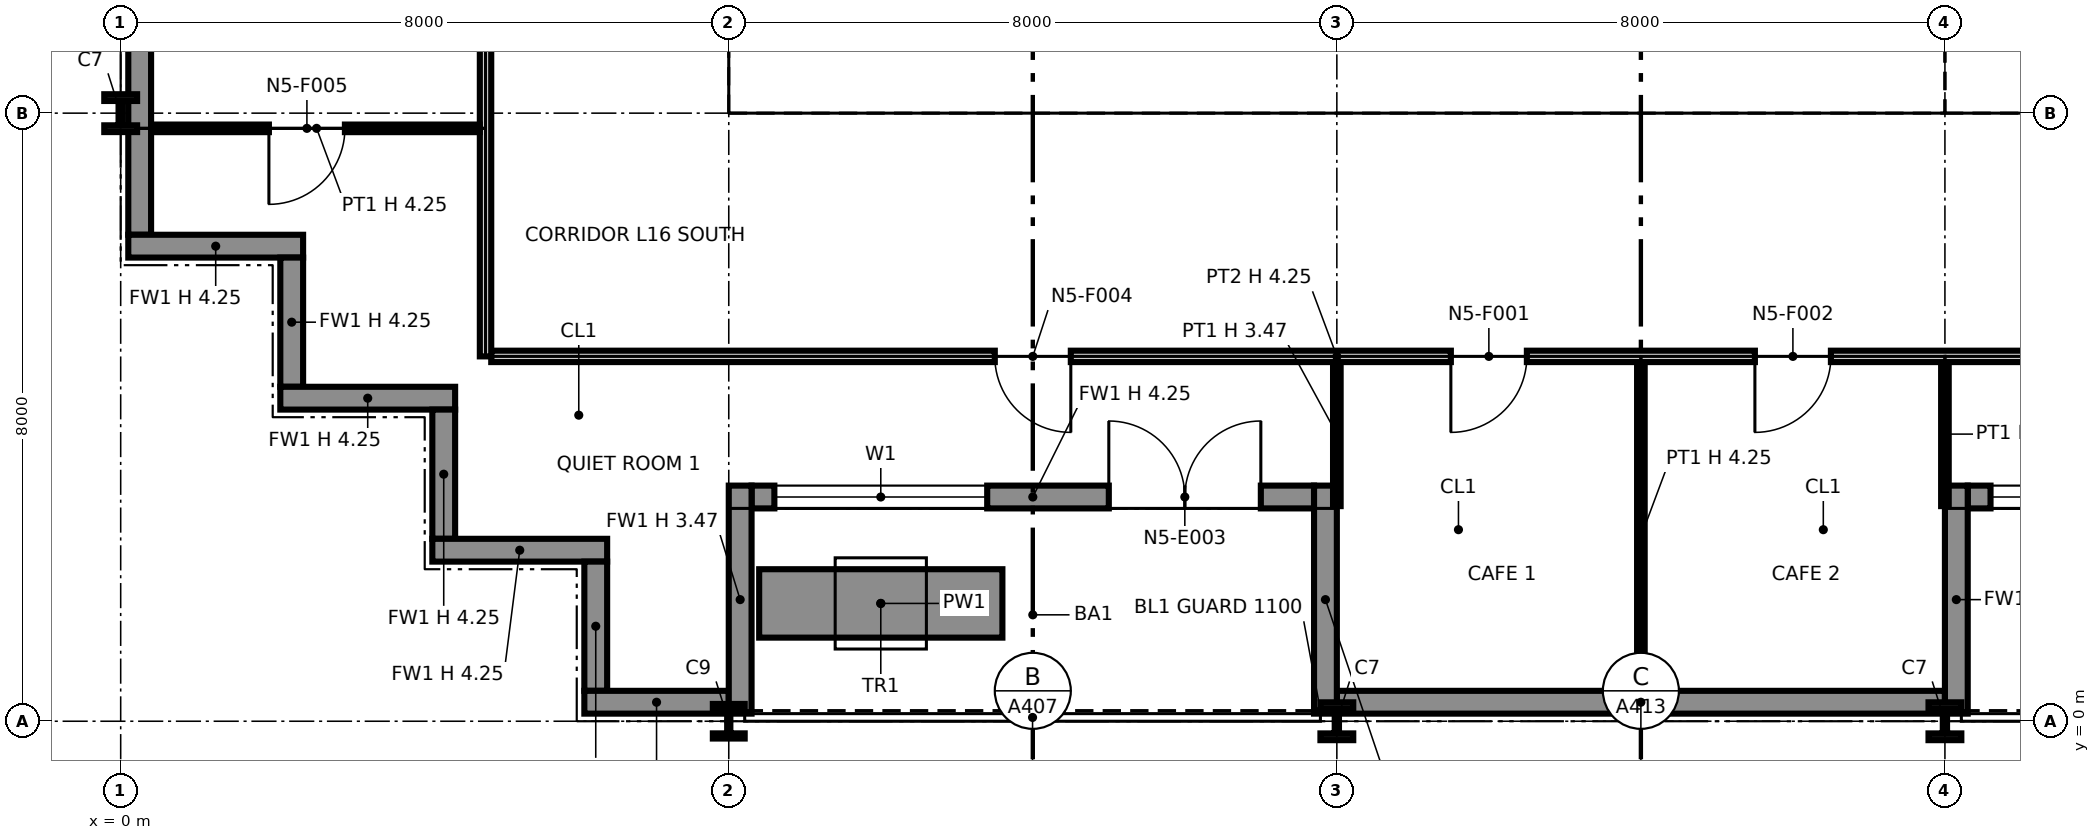
"""IFC4 building model, lengths in metres.
Left out: names, types, materials, properties, quantities, classifications, styles, units other than length and angle.
Written with IfcOpenShell. Run it as: python <this file> out.ifc"""

import sys

from ifc_helpers import new_model, si_unit, direction, frame, frame_2d, origin, origin_2d, place, context, subcontext, project, spatial, polyline, rectangle, i_section, outline, extrude, element, fill, save


model = new_model("IFC4")
c1 = context("Model", 3, precision=1e-05, world=origin(), true_north=direction((0.0, 1.0)))
c2 = subcontext(c1, "Body", "Model", "MODEL_VIEW")
j1 = project(units=[si_unit("LENGTHUNIT", "METRE"), si_unit("PLANEANGLEUNIT", "RADIAN")], contexts=[c1])
p1 = place(None, origin())
s1 = spatial("IfcSite", under=j1, at=p1, CompositionType="ELEMENT")
p2 = place(p1, origin())
s2 = spatial("IfcBuilding", under=s1, at=p2, CompositionType="ELEMENT")
p3 = place(p2, frame((0.0, 0.0, 87.6)))
s3 = spatial("IfcBuildingStorey", under=s2, at=p3, CompositionType="ELEMENT", Elevation=87.6)
p4 = place(p3, frame((0.0, 8.0, 0.0), z_axis=(0.0, 0.0, 1.0), x_axis=(1.0, 0.0, 0.0)))
e1 = element("IfcColumn", 1, at=p4, inside=s3, PredefinedType="COLUMN", context=c2, shape_type="SweptSolid", body=[
    extrude(i_section(OverallWidth=0.432, OverallDepth=0.498, WebThickness=0.056, FlangeThickness=0.089, at=origin_2d()), origin(), (0.0, 0.0, 1.0), 4.25),
])
p5 = place(p3, frame((8.0, 0.0, 0.0), z_axis=(0.0, 0.0, 1.0), x_axis=(1.0, 0.0, 0.0)))
e2 = element("IfcColumn", 2, at=p5, inside=s3, PredefinedType="COLUMN", context=c2, shape_type="SweptSolid", body=[
    extrude(i_section(OverallWidth=0.419, OverallDepth=0.455, WebThickness=0.042, FlangeThickness=0.068, at=origin_2d()), origin(), (0.0, 0.0, 1.0), 4.25),
])
p6 = place(p3, frame((8.0, 8.0, 0.0), z_axis=(0.0, 0.0, 1.0), x_axis=(1.0, 0.0, 0.0)))
e3 = element("IfcColumn", 3, at=p6, inside=s3, PredefinedType="COLUMN", context=c2, shape_type="SweptSolid", body=[
    extrude(i_section(OverallWidth=0.406, OverallDepth=0.417, WebThickness=0.03, FlangeThickness=0.048, at=origin_2d()), origin(), (0.0, 0.0, 1.0), 4.25),
])
p7 = place(p3, frame((16.0, 0.0, 0.0), z_axis=(0.0, 0.0, 1.0), x_axis=(1.0, 0.0, 0.0)))
e4 = element("IfcColumn", 4, at=p7, inside=s3, PredefinedType="COLUMN", context=c2, shape_type="SweptSolid", body=[
    extrude(i_section(OverallWidth=0.432, OverallDepth=0.498, WebThickness=0.056, FlangeThickness=0.089, at=origin_2d()), origin(), (0.0, 0.0, 1.0), 4.25),
])
p8 = place(p3, frame((16.0, 8.0, 0.0), z_axis=(0.0, 0.0, 1.0), x_axis=(1.0, 0.0, 0.0)))
e5 = element("IfcColumn", 5, at=p8, inside=s3, PredefinedType="COLUMN", context=c2, shape_type="SweptSolid", body=[
    extrude(i_section(OverallWidth=0.406, OverallDepth=0.417, WebThickness=0.03, FlangeThickness=0.048, at=origin_2d()), origin(), (0.0, 0.0, 1.0), 4.25),
])
p9 = place(p3, frame((24.0, 0.0, 0.0), z_axis=(0.0, 0.0, 1.0), x_axis=(1.0, 0.0, 0.0)))
e6 = element("IfcColumn", 6, at=p9, inside=s3, PredefinedType="COLUMN", context=c2, shape_type="SweptSolid", body=[
    extrude(i_section(OverallWidth=0.432, OverallDepth=0.498, WebThickness=0.056, FlangeThickness=0.089, at=origin_2d()), origin(), (0.0, 0.0, 1.0), 4.25),
])
p10 = place(p3, frame((24.0, 8.0, 0.0), z_axis=(0.0, 0.0, 1.0), x_axis=(1.0, 0.0, 0.0)))
e7 = element("IfcColumn", 7, at=p10, inside=s3, PredefinedType="COLUMN", context=c2, shape_type="SweptSolid", body=[
    extrude(i_section(OverallWidth=0.411, OverallDepth=0.434, WebThickness=0.036, FlangeThickness=0.057, at=origin_2d()), origin(), (0.0, 0.0, 1.0), 4.25),
])
p11 = place(p3, frame((0.25, 16.0, 0.0), z_axis=(0.0, 0.0, 1.0), x_axis=(0.0, -1.0, 0.0)))
e8 = element("IfcWall", 8, at=p11, inside=s3, PredefinedType="SOLIDWALL", context=c2, shape_type="SweptSolid", body=[
    extrude(rectangle(XDim=9.6, YDim=0.3, at=frame_2d((4.8, 0.0))), origin(), (0.0, 0.0, 1.0), 4.25),
])
p12 = place(p3, frame((0.1, 6.25, 0.0), z_axis=(0.0, 0.0, 1.0), x_axis=(1.0, 0.0, 0.0)))
e9 = element("IfcWall", 9, at=p12, inside=s3, PredefinedType="SOLIDWALL", context=c2, shape_type="SweptSolid", body=[
    extrude(rectangle(XDim=2.3, YDim=0.3, at=frame_2d((1.15, 0.0))), origin(), (0.0, 0.0, 1.0), 4.25),
])
p13 = place(p3, frame((2.25, 6.1, 0.0), z_axis=(0.0, 0.0, 1.0), x_axis=(0.0, -1.0, 0.0)))
e10 = element("IfcWall", 10, at=p13, inside=s3, PredefinedType="SOLIDWALL", context=c2, shape_type="SweptSolid", body=[
    extrude(rectangle(XDim=1.7, YDim=0.3, at=frame_2d((0.85, 0.0))), origin(), (0.0, 0.0, 1.0), 4.25),
])
p14 = place(p3, frame((2.1, 4.25, 0.0), z_axis=(0.0, 0.0, 1.0), x_axis=(1.0, 0.0, 0.0)))
e11 = element("IfcWall", 11, at=p14, inside=s3, PredefinedType="SOLIDWALL", context=c2, shape_type="SweptSolid", body=[
    extrude(rectangle(XDim=2.3, YDim=0.3, at=frame_2d((1.15, 0.0))), origin(), (0.0, 0.0, 1.0), 4.25),
])
p15 = place(p3, frame((4.25, 4.1, 0.0), z_axis=(0.0, 0.0, 1.0), x_axis=(0.0, -1.0, 0.0)))
e12 = element("IfcWall", 12, at=p15, inside=s3, PredefinedType="SOLIDWALL", context=c2, shape_type="SweptSolid", body=[
    extrude(rectangle(XDim=1.7, YDim=0.3, at=frame_2d((0.85, 0.0))), origin(), (0.0, 0.0, 1.0), 4.25),
])
p16 = place(p3, frame((4.1, 2.25, 0.0), z_axis=(0.0, 0.0, 1.0), x_axis=(1.0, 0.0, 0.0)))
e13 = element("IfcWall", 13, at=p16, inside=s3, PredefinedType="SOLIDWALL", context=c2, shape_type="SweptSolid", body=[
    extrude(rectangle(XDim=2.3, YDim=0.3, at=frame_2d((1.15, 0.0))), origin(), (0.0, 0.0, 1.0), 4.25),
])
p17 = place(p3, frame((6.25, 2.1, 0.0), z_axis=(0.0, 0.0, 1.0), x_axis=(0.0, -1.0, 0.0)))
e14 = element("IfcWall", 14, at=p17, inside=s3, PredefinedType="SOLIDWALL", context=c2, shape_type="SweptSolid", body=[
    extrude(rectangle(XDim=1.7, YDim=0.3, at=frame_2d((0.85, 0.0))), origin(), (0.0, 0.0, 1.0), 4.25),
])
p18 = place(p3, frame((6.1, 0.25, 0.0), z_axis=(0.0, 0.0, 1.0), x_axis=(1.0, 0.0, 0.0)))
e15 = element("IfcWall", 15, at=p18, inside=s3, PredefinedType="SOLIDWALL", context=c2, shape_type="SweptSolid", body=[
    extrude(rectangle(XDim=1.9, YDim=0.3, at=frame_2d((0.95, 0.0))), origin(), (0.0, 0.0, 1.0), 4.25),
])
p19 = place(p3, frame((8.3, 2.95, 0.0), z_axis=(0.0, 0.0, 1.0), x_axis=(1.0, 0.0, 0.0)))
e16 = element("IfcWall", 16, at=p19, inside=s3, PredefinedType="SOLIDWALL", context=c2, shape_type="SweptSolid", body=[
    extrude(rectangle(XDim=7.4, YDim=0.3, at=frame_2d((3.7, 0.0))), origin(), (0.0, 0.0, 1.0), 4.25),
])
p20 = place(p19, frame((0.3, 0.0, 0.9)))
e17 = element("IfcOpeningElement", 17, at=p20, cuts=e16, PredefinedType="OPENING", context=c2, shape_type="SweptSolid", body=[
    extrude(rectangle(XDim=2.8, YDim=2.2, at=frame_2d((1.4, 1.1))), frame((0.0, 0.16, 0.0), z_axis=(0.0, -1.0, 0.0), x_axis=(1.0, 0.0, 0.0)), (0.0, 0.0, 1.0), 0.32),
])
p21 = place(p19, frame((4.7, 0.0, 0.0)))
e18 = element("IfcOpeningElement", 18, at=p21, cuts=e16, PredefinedType="OPENING", context=c2, shape_type="SweptSolid", body=[
    extrude(rectangle(XDim=2.0, YDim=2.4, at=frame_2d((1.0, 1.2))), frame((0.0, 0.16, 0.0), z_axis=(0.0, -1.0, 0.0), x_axis=(1.0, 0.0, 0.0)), (0.0, 0.0, 1.0), 0.32),
])
p22 = place(p3, frame((8.15, 0.1, 0.0), z_axis=(0.0, 0.0, 1.0), x_axis=(0.0, 1.0, 0.0)))
e19 = element("IfcWall", 19, at=p22, inside=s3, PredefinedType="SOLIDWALL", context=c2, shape_type="SweptSolid", body=[
    extrude(rectangle(XDim=3.0, YDim=0.3, at=frame_2d((1.5, 0.0))), origin(), (0.0, 0.0, 1.0), 3.469),
])
p23 = place(p3, frame((15.85, 0.1, 0.0), z_axis=(0.0, 0.0, 1.0), x_axis=(0.0, 1.0, 0.0)))
e20 = element("IfcWall", 20, at=p23, inside=s3, PredefinedType="SOLIDWALL", context=c2, shape_type="SweptSolid", body=[
    extrude(rectangle(XDim=3.0, YDim=0.3, at=frame_2d((1.5, 0.0))), origin(), (0.0, 0.0, 1.0), 3.556),
])
p24 = place(p3, frame((16.0, 0.25, 0.0), z_axis=(0.0, 0.0, 1.0), x_axis=(1.0, 0.0, 0.0)))
e21 = element("IfcWall", 21, at=p24, inside=s3, PredefinedType="SOLIDWALL", context=c2, shape_type="SweptSolid", body=[
    extrude(rectangle(XDim=8.0, YDim=0.3, at=frame_2d((4.0, 0.0))), origin(), (0.0, 0.0, 1.0), 4.25),
])
p25 = place(p3, frame((24.3, 2.95, 0.0), z_axis=(0.0, 0.0, 1.0), x_axis=(1.0, 0.0, 0.0)))
e22 = element("IfcWall", 22, at=p25, inside=s3, PredefinedType="SOLIDWALL", context=c2, shape_type="SweptSolid", body=[
    extrude(rectangle(XDim=7.4, YDim=0.3, at=frame_2d((3.7, 0.0))), origin(), (0.0, 0.0, 1.0), 4.25),
])
p26 = place(p25, frame((0.3, 0.0, 0.9)))
e23 = element("IfcOpeningElement", 23, at=p26, cuts=e22, PredefinedType="OPENING", context=c2, shape_type="SweptSolid", body=[
    extrude(rectangle(XDim=2.8, YDim=2.2, at=frame_2d((1.4, 1.1))), frame((0.0, 0.16, 0.0), z_axis=(0.0, -1.0, 0.0), x_axis=(1.0, 0.0, 0.0)), (0.0, 0.0, 1.0), 0.32),
])
p27 = place(p25, frame((4.7, 0.0, 0.0)))
e24 = element("IfcOpeningElement", 24, at=p27, cuts=e22, PredefinedType="OPENING", context=c2, shape_type="SweptSolid", body=[
    extrude(rectangle(XDim=2.0, YDim=2.4, at=frame_2d((1.0, 1.2))), frame((0.0, 0.16, 0.0), z_axis=(0.0, -1.0, 0.0), x_axis=(1.0, 0.0, 0.0)), (0.0, 0.0, 1.0), 0.32),
])
p28 = place(p3, frame((24.15, 0.1, 0.0), z_axis=(0.0, 0.0, 1.0), x_axis=(0.0, 1.0, 0.0)))
e25 = element("IfcWall", 25, at=p28, inside=s3, PredefinedType="SOLIDWALL", context=c2, shape_type="SweptSolid", body=[
    extrude(rectangle(XDim=3.0, YDim=0.3, at=frame_2d((1.5, 0.0))), origin(), (0.0, 0.0, 1.0), 3.556),
])
p29 = place(p3, frame((8.4, 1.55, 0.0), z_axis=(0.0, 0.0, 1.0), x_axis=(1.0, 0.0, 0.0)))
e26 = element("IfcWall", 26, at=p29, inside=s3, PredefinedType="SOLIDWALL", context=c2, shape_type="SweptSolid", body=[
    extrude(rectangle(XDim=3.2, YDim=0.9, at=frame_2d((1.6, 0.0))), origin(), (0.0, 0.0, 1.0), 0.6),
])
p30 = place(p3, frame((8.65, 8.75, 0.0), z_axis=(0.0, 0.0, 1.0), x_axis=(1.0, 0.0, 0.0)))
e27 = element("IfcWall", 27, at=p30, inside=s3, PredefinedType="PARTITIONING", context=c2, shape_type="SweptSolid", body=[
    extrude(outline(polyline([(0.0, 0.0), (14.7, 0.0), (14.7, 4.25), (7.469, 4.25), (7.469, 3.632), (7.231, 3.632), (7.23, 4.25), (0.0, 4.25), (0.0, 0.0)])), frame((0.0, 0.1, 0.0), z_axis=(0.0, -1.0, 0.0), x_axis=(1.0, 0.0, 0.0)), (0.0, 0.0, 1.0), 0.2),
])
p31 = place(p30, frame((1.3, 0.0, 0.0)))
e28 = element("IfcOpeningElement", 28, at=p31, cuts=e27, PredefinedType="OPENING", context=c2, shape_type="SweptSolid", body=[
    extrude(rectangle(XDim=1.4, YDim=2.1, at=frame_2d((0.7, 1.05))), frame((0.0, 0.11, 0.0), z_axis=(0.0, -1.0, 0.0), x_axis=(1.0, 0.0, 0.0)), (0.0, 0.0, 1.0), 0.22),
])
p32 = place(p30, frame((4.6, 0.0, 0.0)))
e29 = element("IfcOpeningElement", 29, at=p32, cuts=e27, PredefinedType="OPENING", context=c2, shape_type="SweptSolid", body=[
    extrude(rectangle(XDim=1.4, YDim=2.1, at=frame_2d((0.7, 1.05))), frame((0.0, 0.11, 0.0), z_axis=(0.0, -1.0, 0.0), x_axis=(1.0, 0.0, 0.0)), (0.0, 0.0, 1.0), 0.22),
])
p33 = place(p30, frame((10.4, 0.0, 0.0)))
e30 = element("IfcOpeningElement", 30, at=p33, cuts=e27, PredefinedType="OPENING", context=c2, shape_type="SweptSolid", body=[
    extrude(rectangle(XDim=1.2, YDim=2.1, at=frame_2d((0.6, 1.05))), frame((0.0, 0.11, 0.0), z_axis=(0.0, -1.0, 0.0), x_axis=(1.0, 0.0, 0.0)), (0.0, 0.0, 1.0), 0.22),
])
p34 = place(p3, frame((24.65, 8.75, 0.0), z_axis=(0.0, 0.0, 1.0), x_axis=(1.0, 0.0, 0.0)))
e31 = element("IfcWall", 31, at=p34, inside=s3, PredefinedType="PARTITIONING", context=c2, shape_type="SweptSolid", body=[
    extrude(outline(polyline([(0.0, 0.0), (14.7, 0.0), (14.7, 4.25), (7.469, 4.25), (7.469, 3.632), (7.231, 3.632), (7.23, 4.25), (0.0, 4.25), (0.0, 0.0)])), frame((0.0, 0.1, 0.0), z_axis=(0.0, -1.0, 0.0), x_axis=(1.0, 0.0, 0.0)), (0.0, 0.0, 1.0), 0.2),
])
p35 = place(p3, frame((20.0, 0.13, 0.0), z_axis=(0.0, 0.0, 1.0), x_axis=(0.0, 1.0, 0.0)))
e32 = element("IfcWall", 32, at=p35, inside=s3, PredefinedType="PARTITIONING", context=c2, shape_type="SweptSolid", body=[
    extrude(outline(polyline([(0.0, 0.0), (4.595, 0.0), (4.595, 4.25), (4.17, 4.25), (4.168, 3.47), (3.572, 3.47), (3.57, 4.25), (0.0, 4.25), (0.0, 0.0)])), frame((0.0, 0.05, 0.0), z_axis=(0.0, -1.0, 0.0), x_axis=(1.0, 0.0, 0.0)), (0.0, 0.0, 1.0), 0.1),
])
for number, where, z_axis, x_axis in (
    (33, (16.0, 2.83, 0.0), (0.0, 0.0, 1.0), (0.0, 1.0, 0.0)),
    (34, (24.0, 2.83, 0.0), (0.0, 0.0, 1.0), (0.0, 1.0, 0.0)),
):
    element("IfcWall", number, at=place(p3, frame(where, z_axis=z_axis, x_axis=x_axis)), inside=s3, PredefinedType="PARTITIONING", context=c2, shape_type="SweptSolid", body=[
        extrude(rectangle(XDim=1.895, YDim=0.1, at=frame_2d((0.948, 0.0))), origin(), (0.0, 0.0, 1.0), 3.47),
    ])
p36 = place(p3, frame((4.875, 4.8, 0.0), z_axis=(0.0, 0.0, 1.0), x_axis=(1.0, 0.0, 0.0)))
e35 = element("IfcWall", 35, at=p36, inside=s3, PredefinedType="PARTITIONING", context=c2, shape_type="SweptSolid", body=[
    extrude(rectangle(XDim=22.25, YDim=0.15, at=frame_2d((11.125, 0.0))), origin(), (0.0, 0.0, 1.0), 4.25),
])
p37 = place(p36, frame((13.625, 0.0, 0.0), z_axis=(0.0, 0.0, 1.0), x_axis=(-1.0, 0.0, 0.0)))
e36 = element("IfcOpeningElement", 36, at=p37, cuts=e35, PredefinedType="OPENING", context=c2, shape_type="SweptSolid", body=[
    extrude(rectangle(XDim=1.0, YDim=2.1, at=frame_2d((0.5, 1.05))), frame((0.0, 0.085, 0.0), z_axis=(0.0, -1.0, 0.0), x_axis=(1.0, 0.0, 0.0)), (0.0, 0.0, 1.0), 0.17),
])
p38 = place(p36, frame((17.625, 0.0, 0.0), z_axis=(0.0, 0.0, 1.0), x_axis=(-1.0, 0.0, 0.0)))
e37 = element("IfcOpeningElement", 37, at=p38, cuts=e35, PredefinedType="OPENING", context=c2, shape_type="SweptSolid", body=[
    extrude(rectangle(XDim=1.0, YDim=2.1, at=frame_2d((0.5, 1.05))), frame((0.0, 0.085, 0.0), z_axis=(0.0, -1.0, 0.0), x_axis=(1.0, 0.0, 0.0)), (0.0, 0.0, 1.0), 0.17),
])
p39 = place(p36, frame((7.625, 0.0, 0.0), z_axis=(0.0, 0.0, 1.0), x_axis=(-1.0, 0.0, 0.0)))
e38 = element("IfcOpeningElement", 38, at=p39, cuts=e35, PredefinedType="OPENING", context=c2, shape_type="SweptSolid", body=[
    extrude(rectangle(XDim=1.0, YDim=2.1, at=frame_2d((0.5, 1.05))), frame((0.0, 0.085, 0.0), z_axis=(0.0, -1.0, 0.0), x_axis=(1.0, 0.0, 0.0)), (0.0, 0.0, 1.0), 0.17),
])
p40 = place(p3, frame((4.8, 4.8, 0.0), z_axis=(0.0, 0.0, 1.0), x_axis=(0.0, 1.0, 0.0)))
e39 = element("IfcWall", 39, at=p40, inside=s3, PredefinedType="PARTITIONING", context=c2, shape_type="SweptSolid", body=[
    extrude(outline(polyline([(0.0, 0.0), (14.575, 0.0), (14.575, 4.25), (11.5, 4.25), (11.498, 3.47), (10.902, 3.47), (10.9, 4.25), (7.5, 4.25), (7.498, 3.47), (6.902, 3.47), (6.9, 4.25), (3.5, 4.25), (3.498, 3.47), (2.902, 3.47), (2.9, 4.25), (0.0, 4.25), (0.0, 0.0)])), frame((0.0, 0.075, 0.0), z_axis=(0.0, -1.0, 0.0), x_axis=(1.0, 0.0, 0.0)), (0.0, 0.0, 1.0), 0.15),
])
p41 = place(p40, frame((12.425, 0.0, 0.0)))
e40 = element("IfcOpeningElement", 40, at=p41, cuts=e39, PredefinedType="OPENING", context=c2, shape_type="SweptSolid", body=[
    extrude(rectangle(XDim=1.0, YDim=2.1, at=frame_2d((0.5, 1.05))), frame((0.0, 0.085, 0.0), z_axis=(0.0, -1.0, 0.0), x_axis=(1.0, 0.0, 0.0)), (0.0, 0.0, 1.0), 0.17),
])
p42 = place(p3, frame((0.43, 7.8, 0.0), z_axis=(0.0, 0.0, 1.0), x_axis=(1.0, 0.0, 0.0)))
e41 = element("IfcWall", 41, at=p42, inside=s3, PredefinedType="PARTITIONING", context=c2, shape_type="SweptSolid", body=[
    extrude(rectangle(XDim=4.295, YDim=0.1, at=frame_2d((2.147, 0.0))), origin(), (0.0, 0.0, 1.0), 4.25),
])
p43 = place(p42, frame((2.52, 0.0, 0.0), z_axis=(0.0, 0.0, 1.0), x_axis=(-1.0, 0.0, 0.0)))
e42 = element("IfcOpeningElement", 42, at=p43, cuts=e41, PredefinedType="OPENING", context=c2, shape_type="SweptSolid", body=[
    extrude(rectangle(XDim=1.0, YDim=2.1, at=frame_2d((0.5, 1.05))), frame((0.0, 0.06, 0.0), z_axis=(0.0, -1.0, 0.0), x_axis=(1.0, 0.0, 0.0)), (0.0, 0.0, 1.0), 0.12),
])
p44 = place(p20, origin())
e43 = element("IfcWindow", 43, at=p44, inside=s3, PartitioningType="SINGLE_PANEL", PredefinedType="WINDOW", context=c2, shape_type="SweptSolid", body=[
    extrude(rectangle(XDim=2.8, YDim=2.2, at=frame_2d((1.4, 1.1))), frame((0.0, 0.03, 0.0), z_axis=(0.0, -1.0, 0.0), x_axis=(1.0, 0.0, 0.0)), (0.0, 0.0, 1.0), 0.06),
])
fill(e17, e43)
p45 = place(p21, origin())
e44 = element("IfcDoor", 44, at=p45, inside=s3, OperationType="DOUBLE_DOOR_SINGLE_SWING", PredefinedType="DOOR", context=c2, shape_type="SweptSolid", body=[
    extrude(rectangle(XDim=2.0, YDim=2.4, at=frame_2d((1.0, 1.2))), frame((0.0, 0.025, 0.0), z_axis=(0.0, -1.0, 0.0), x_axis=(1.0, 0.0, 0.0)), (0.0, 0.0, 1.0), 0.05),
])
fill(e18, e44)
p46 = place(p26, origin())
e45 = element("IfcWindow", 45, at=p46, inside=s3, PartitioningType="SINGLE_PANEL", PredefinedType="WINDOW", context=c2, shape_type="SweptSolid", body=[
    extrude(rectangle(XDim=2.8, YDim=2.2, at=frame_2d((1.4, 1.1))), frame((0.0, 0.03, 0.0), z_axis=(0.0, -1.0, 0.0), x_axis=(1.0, 0.0, 0.0)), (0.0, 0.0, 1.0), 0.06),
])
fill(e23, e45)
p47 = place(p31, origin())
e46 = element("IfcDoor", 46, at=p47, inside=s3, OperationType="DOUBLE_DOOR_SINGLE_SWING", PredefinedType="NOTDEFINED", context=c2, shape_type="SweptSolid", body=[
    extrude(rectangle(XDim=1.4, YDim=2.1, at=frame_2d((0.7, 1.05))), frame((0.0, 0.025, 0.0), z_axis=(0.0, -1.0, 0.0), x_axis=(1.0, 0.0, 0.0)), (0.0, 0.0, 1.0), 0.05),
])
fill(e28, e46)
p48 = place(p32, origin())
e47 = element("IfcDoor", 47, at=p48, inside=s3, OperationType="DOUBLE_DOOR_SINGLE_SWING", PredefinedType="NOTDEFINED", context=c2, shape_type="SweptSolid", body=[
    extrude(rectangle(XDim=1.4, YDim=2.1, at=frame_2d((0.7, 1.05))), frame((0.0, 0.025, 0.0), z_axis=(0.0, -1.0, 0.0), x_axis=(1.0, 0.0, 0.0)), (0.0, 0.0, 1.0), 0.05),
])
fill(e29, e47)
p49 = place(p33, origin())
e48 = element("IfcDoor", 48, at=p49, inside=s3, OperationType="SINGLE_SWING_RIGHT", PredefinedType="NOTDEFINED", context=c2, shape_type="SweptSolid", body=[
    extrude(rectangle(XDim=1.2, YDim=2.1, at=frame_2d((0.6, 1.05))), frame((0.0, 0.025, 0.0), z_axis=(0.0, -1.0, 0.0), x_axis=(1.0, 0.0, 0.0)), (0.0, 0.0, 1.0), 0.05),
])
fill(e30, e48)
p50 = place(p37, origin())
e49 = element("IfcDoor", 49, at=p50, inside=s3, OperationType="SINGLE_SWING_RIGHT", PredefinedType="DOOR", context=c2, shape_type="SweptSolid", body=[
    extrude(rectangle(XDim=1.0, YDim=2.1, at=frame_2d((0.5, 1.05))), frame((0.0, 0.025, 0.0), z_axis=(0.0, -1.0, 0.0), x_axis=(1.0, 0.0, 0.0)), (0.0, 0.0, 1.0), 0.05),
])
fill(e36, e49)
p51 = place(p38, origin())
e50 = element("IfcDoor", 50, at=p51, inside=s3, OperationType="SINGLE_SWING_RIGHT", PredefinedType="DOOR", context=c2, shape_type="SweptSolid", body=[
    extrude(rectangle(XDim=1.0, YDim=2.1, at=frame_2d((0.5, 1.05))), frame((0.0, 0.025, 0.0), z_axis=(0.0, -1.0, 0.0), x_axis=(1.0, 0.0, 0.0)), (0.0, 0.0, 1.0), 0.05),
])
fill(e37, e50)
p52 = place(p39, origin())
e51 = element("IfcDoor", 51, at=p52, inside=s3, OperationType="SINGLE_SWING_LEFT", PredefinedType="DOOR", context=c2, shape_type="SweptSolid", body=[
    extrude(rectangle(XDim=1.0, YDim=2.1, at=frame_2d((0.5, 1.05))), frame((0.0, 0.025, 0.0), z_axis=(0.0, -1.0, 0.0), x_axis=(1.0, 0.0, 0.0)), (0.0, 0.0, 1.0), 0.05),
])
fill(e38, e51)
p53 = place(p43, origin())
e52 = element("IfcDoor", 52, at=p53, inside=s3, OperationType="SINGLE_SWING_RIGHT", PredefinedType="DOOR", context=c2, shape_type="SweptSolid", body=[
    extrude(rectangle(XDim=1.0, YDim=2.1, at=frame_2d((0.5, 1.05))), frame((0.0, 0.025, 0.0), z_axis=(0.0, -1.0, 0.0), x_axis=(1.0, 0.0, 0.0)), (0.0, 0.0, 1.0), 0.05),
])
fill(e42, e52)
save(model, sys.argv[1])
